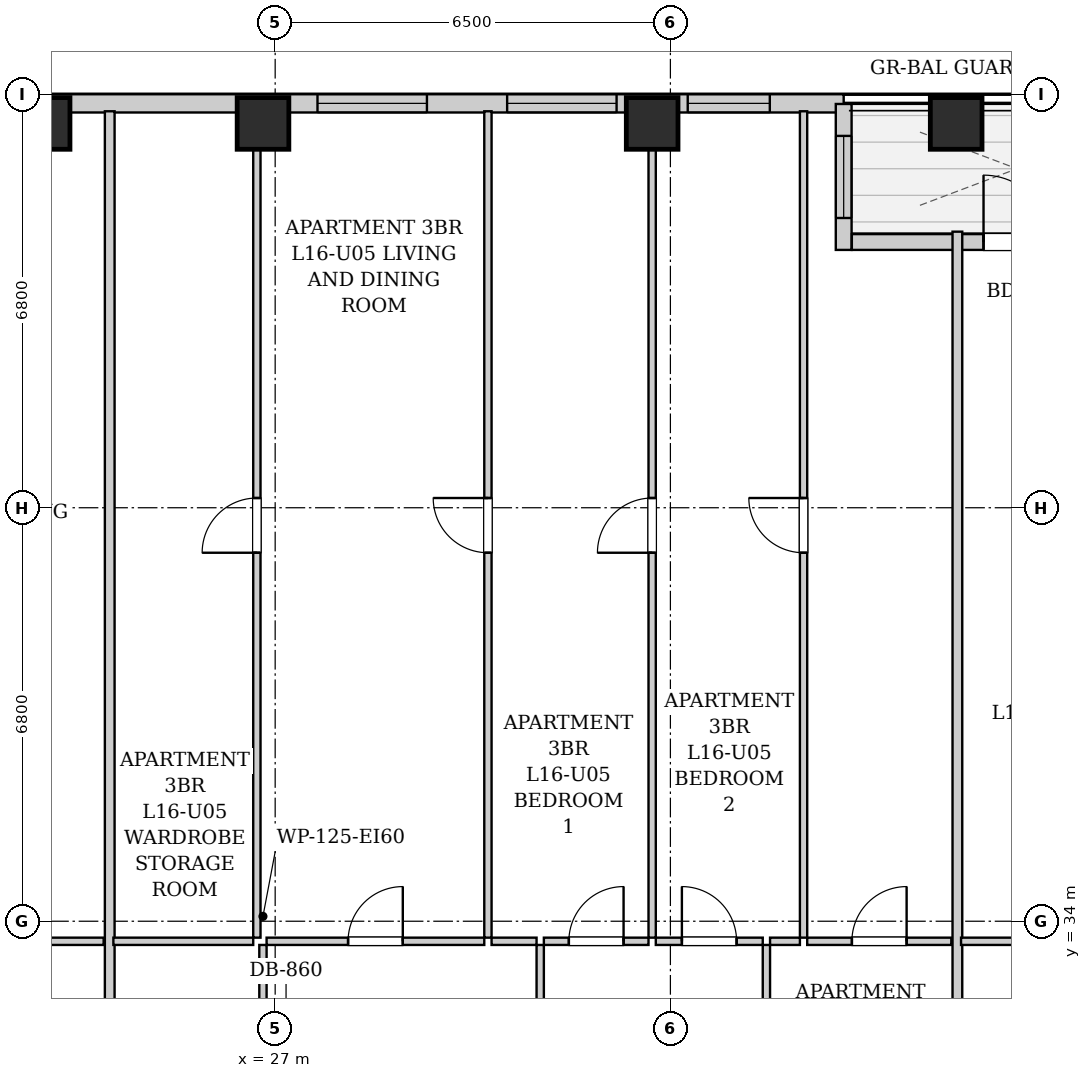
"""IFC4 building model, lengths in metres.
Left out: names, types, materials, properties, quantities, classifications, styles, units other than length and angle.
Written with IfcOpenShell. Run it as: python <this file> out.ifc"""

import sys

from ifc_helpers import new_model, si_unit, direction, frame, frame_2d, origin, origin_2d, place, context, subcontext, project, spatial, rectangle, extrude, element, fill, save


model = new_model("IFC4")
c1 = context("Model", 3, precision=1e-05, world=origin(), true_north=direction((0.0, 1.0)))
c2 = subcontext(c1, "Body", "Model", "MODEL_VIEW")
j1 = project(units=[si_unit("LENGTHUNIT", "METRE"), si_unit("PLANEANGLEUNIT", "RADIAN")], contexts=[c1])
p1 = place(None, origin())
s1 = spatial("IfcSite", under=j1, at=p1, CompositionType="ELEMENT")
p2 = place(p1, origin())
s2 = spatial("IfcBuilding", under=s1, at=p2, CompositionType="ELEMENT")
p3 = place(p2, frame((0.0, 0.0, 61.0)))
s3 = spatial("IfcBuildingStorey", under=s2, at=p3, CompositionType="ELEMENT", Elevation=61.0)
for number, where, z_axis, x_axis in (
    (1, (23.2, 47.12, 0.0), (0.0, 0.0, 1.0), (1.0, 0.0, 0.0)),
    (2, (26.8, 47.12, 0.0), (0.0, 0.0, 1.0), (1.0, 0.0, 0.0)),
    (3, (33.2, 47.12, 0.0), (0.0, 0.0, 1.0), (1.0, 0.0, 0.0)),
    (4, (38.2, 47.12, 0.0), (0.0, 0.0, 1.0), (1.0, 0.0, 0.0)),
):
    element("IfcColumn", number, at=place(p3, frame(where, z_axis=z_axis, x_axis=x_axis)), inside=s3, PredefinedType="COLUMN", context=c2, shape_type="SweptSolid", body=[
        extrude(rectangle(XDim=0.85, YDim=0.85, at=origin_2d()), origin(), (0.0, 0.0, 1.0), 3.2),
    ])
p4 = place(p3, frame((10.0, 47.45, 0.0), z_axis=(0.0, 0.0, 1.0), x_axis=(1.0, 0.0, 0.0)))
e5 = element("IfcWall", 5, at=p4, inside=s3, PredefinedType="SOLIDWALL", context=c2, shape_type="SweptSolid", body=[
    extrude(rectangle(XDim=26.35, YDim=0.3, at=frame_2d((13.175, 0.0))), origin(), (0.0, 0.0, 1.0), 1.975),
])
p5 = place(p4, frame((1.735, 0.0, 0.55)))
e6 = element("IfcOpeningElement", 6, at=p5, cuts=e5, PredefinedType="OPENING", context=c2, shape_type="SweptSolid", body=[
    extrude(rectangle(XDim=1.8, YDim=1.2, at=frame_2d((0.9, 0.6))), frame((0.0, 0.16, 0.0), z_axis=(0.0, -1.0, 0.0), x_axis=(1.0, 0.0, 0.0)), (0.0, 0.0, 1.0), 0.32),
])
p6 = place(p4, frame((5.415, 0.0, 0.55)))
e7 = element("IfcOpeningElement", 7, at=p6, cuts=e5, PredefinedType="OPENING", context=c2, shape_type="SweptSolid", body=[
    extrude(rectangle(XDim=1.8, YDim=1.2, at=frame_2d((0.9, 0.6))), frame((0.0, 0.16, 0.0), z_axis=(0.0, -1.0, 0.0), x_axis=(1.0, 0.0, 0.0)), (0.0, 0.0, 1.0), 0.32),
])
p7 = place(p4, frame((10.618, 0.0, 0.55)))
e8 = element("IfcOpeningElement", 8, at=p7, cuts=e5, PredefinedType="OPENING", context=c2, shape_type="SweptSolid", body=[
    extrude(rectangle(XDim=1.8, YDim=1.2, at=frame_2d((0.9, 0.6))), frame((0.0, 0.16, 0.0), z_axis=(0.0, -1.0, 0.0), x_axis=(1.0, 0.0, 0.0)), (0.0, 0.0, 1.0), 0.32),
])
p8 = place(p4, frame((17.696, 0.0, 0.55)))
e9 = element("IfcOpeningElement", 9, at=p8, cuts=e5, PredefinedType="OPENING", context=c2, shape_type="SweptSolid", body=[
    extrude(rectangle(XDim=1.8, YDim=1.2, at=frame_2d((0.9, 0.6))), frame((0.0, 0.16, 0.0), z_axis=(0.0, -1.0, 0.0), x_axis=(1.0, 0.0, 0.0)), (0.0, 0.0, 1.0), 0.32),
])
p9 = place(p4, frame((20.815, 0.0, 0.55)))
e10 = element("IfcOpeningElement", 10, at=p9, cuts=e5, PredefinedType="OPENING", context=c2, shape_type="SweptSolid", body=[
    extrude(rectangle(XDim=1.8, YDim=1.2, at=frame_2d((0.9, 0.6))), frame((0.0, 0.16, 0.0), z_axis=(0.0, -1.0, 0.0), x_axis=(1.0, 0.0, 0.0)), (0.0, 0.0, 1.0), 0.32),
])
p10 = place(p4, frame((23.785, 0.0, 0.55)))
e11 = element("IfcOpeningElement", 11, at=p10, cuts=e5, PredefinedType="OPENING", context=c2, shape_type="SweptSolid", body=[
    extrude(rectangle(XDim=1.35, YDim=1.2, at=frame_2d((0.675, 0.6))), frame((0.0, 0.16, 0.0), z_axis=(0.0, -1.0, 0.0), x_axis=(1.0, 0.0, 0.0)), (0.0, 0.0, 1.0), 0.32),
])
p11 = place(p3, frame((36.35, 47.44, 0.0), z_axis=(0.0, 0.0, 1.0), x_axis=(0.0, -1.0, 0.0)))
e12 = element("IfcWall", 12, at=p11, inside=s3, PredefinedType="SOLIDWALL", context=c2, shape_type="SweptSolid", body=[
    extrude(rectangle(XDim=2.4, YDim=0.26, at=frame_2d((1.2, 0.0))), origin(), (0.0, 0.0, 1.0), 2.94),
])
p12 = place(p11, frame((0.525, 0.0, 0.55)))
e13 = element("IfcOpeningElement", 13, at=p12, cuts=e12, PredefinedType="OPENING", context=c2, shape_type="SweptSolid", body=[
    extrude(rectangle(XDim=1.35, YDim=1.2, at=frame_2d((0.675, 0.6))), frame((0.0, 0.14, 0.0), z_axis=(0.0, -1.0, 0.0), x_axis=(1.0, 0.0, 0.0)), (0.0, 0.0, 1.0), 0.28),
])
p13 = place(p3, frame((36.484, 45.17, 0.0), z_axis=(0.0, 0.0, 1.0), x_axis=(1.0, 0.0, 0.0)))
e14 = element("IfcWall", 14, at=p13, inside=s3, PredefinedType="SOLIDWALL", context=c2, shape_type="SweptSolid", body=[
    extrude(rectangle(XDim=5.432, YDim=0.26, at=frame_2d((2.716, 0.0))), origin(), (0.0, 0.0, 1.0), 2.94),
])
p14 = place(p13, frame((2.166, 0.0, 0.0)))
e15 = element("IfcOpeningElement", 15, at=p14, cuts=e14, PredefinedType="OPENING", context=c2, shape_type="SweptSolid", body=[
    extrude(rectangle(XDim=1.1, YDim=2.0, at=frame_2d((0.55, 1.0))), frame((0.0, 0.14, 0.0), z_axis=(0.0, -1.0, 0.0), x_axis=(1.0, 0.0, 0.0)), (0.0, 0.0, 1.0), 0.28),
])
p15 = place(p13, frame((3.526, 0.0, 0.85)))
e16 = element("IfcOpeningElement", 16, at=p15, cuts=e14, PredefinedType="OPENING", context=c2, shape_type="SweptSolid", body=[
    extrude(rectangle(XDim=1.35, YDim=1.65, at=frame_2d((0.675, 0.825))), frame((0.0, 0.14, 0.0), z_axis=(0.0, -1.0, 0.0), x_axis=(1.0, 0.0, 0.0)), (0.0, 0.0, 1.0), 0.28),
])
p16 = place(p3, frame((20.826, 33.67, 0.0), z_axis=(0.0, 0.0, 1.0), x_axis=(1.0, 0.0, 0.0)))
e17 = element("IfcWall", 17, at=p16, inside=s3, PredefinedType="PARTITIONING", context=c2, shape_type="SweptSolid", body=[
    extrude(rectangle(XDim=3.353, YDim=0.12, at=frame_2d((1.677, 0.0))), origin(), (0.0, 0.0, 1.0), 2.94),
])
p17 = place(p16, frame((1.226, 0.0, 0.0)))
e18 = element("IfcOpeningElement", 18, at=p17, cuts=e17, PredefinedType="OPENING", context=c2, shape_type="SweptSolid", body=[
    extrude(rectangle(XDim=0.9, YDim=2.05, at=frame_2d((0.45, 1.025))), frame((0.0, 0.07, 0.0), z_axis=(0.0, -1.0, 0.0), x_axis=(1.0, 0.0, 0.0)), (0.0, 0.0, 1.0), 0.14),
])
p18 = place(p3, frame((24.279, 30.76, 0.0), z_axis=(0.0, 0.0, 1.0), x_axis=(0.0, 1.0, 0.0)))
e19 = element("IfcWall", 19, at=p18, inside=s3, PredefinedType="PARTITIONING", context=c2, shape_type="SweptSolid", body=[
    extrude(rectangle(XDim=16.56, YDim=0.16, at=frame_2d((8.28, 0.0))), origin(), (0.0, 0.0, 1.0), 2.94),
])
p19 = place(p3, frame((26.799, 30.76, 0.0), z_axis=(0.0, 0.0, 1.0), x_axis=(0.0, 1.0, 0.0)))
e20 = element("IfcWall", 20, at=p19, inside=s3, PredefinedType="PARTITIONING", context=c2, shape_type="SweptSolid", body=[
    extrude(rectangle(XDim=2.85, YDim=0.12, at=frame_2d((1.425, 0.0))), origin(), (0.0, 0.0, 1.0), 2.94),
])
p20 = place(p19, frame((0.995, 0.0, 0.0)))
e21 = element("IfcOpeningElement", 21, at=p20, cuts=e20, PredefinedType="OPENING", context=c2, shape_type="SweptSolid", body=[
    extrude(rectangle(XDim=0.86, YDim=2.05, at=frame_2d((0.43, 1.025))), frame((0.0, 0.07, 0.0), z_axis=(0.0, -1.0, 0.0), x_axis=(1.0, 0.0, 0.0)), (0.0, 0.0, 1.0), 0.14),
])
p21 = place(p3, frame((24.339, 33.67, 0.0), z_axis=(0.0, 0.0, 1.0), x_axis=(1.0, 0.0, 0.0)))
e22 = element("IfcWall", 22, at=p21, inside=s3, PredefinedType="PARTITIONING", context=c2, shape_type="SweptSolid", body=[
    extrude(rectangle(XDim=2.3, YDim=0.12, at=frame_2d((1.15, 0.0))), origin(), (0.0, 0.0, 1.0), 2.94),
])
p22 = place(p3, frame((31.359, 30.76, 0.0), z_axis=(0.0, 0.0, 1.0), x_axis=(0.0, 1.0, 0.0)))
e23 = element("IfcWall", 23, at=p22, inside=s3, PredefinedType="PARTITIONING", context=c2, shape_type="SweptSolid", body=[
    extrude(rectangle(XDim=2.85, YDim=0.12, at=frame_2d((1.425, 0.0))), origin(), (0.0, 0.0, 1.0), 2.94),
])
p23 = place(p22, frame((0.975, 0.0, 0.0)))
e24 = element("IfcOpeningElement", 24, at=p23, cuts=e23, PredefinedType="OPENING", context=c2, shape_type="SweptSolid", body=[
    extrude(rectangle(XDim=0.9, YDim=2.05, at=frame_2d((0.45, 1.025))), frame((0.0, 0.07, 0.0), z_axis=(0.0, -1.0, 0.0), x_axis=(1.0, 0.0, 0.0)), (0.0, 0.0, 1.0), 0.14),
])
p24 = place(p3, frame((26.859, 33.67, 0.0), z_axis=(0.0, 0.0, 1.0), x_axis=(1.0, 0.0, 0.0)))
e25 = element("IfcWall", 25, at=p24, inside=s3, PredefinedType="PARTITIONING", context=c2, shape_type="SweptSolid", body=[
    extrude(rectangle(XDim=3.58, YDim=0.12, at=frame_2d((1.79, 0.0))), origin(), (0.0, 0.0, 1.0), 2.94),
])
p25 = place(p24, frame((1.34, 0.0, 0.0)))
e26 = element("IfcOpeningElement", 26, at=p25, cuts=e25, PredefinedType="OPENING", context=c2, shape_type="SweptSolid", body=[
    extrude(rectangle(XDim=0.9, YDim=2.05, at=frame_2d((0.45, 1.025))), frame((0.0, 0.07, 0.0), z_axis=(0.0, -1.0, 0.0), x_axis=(1.0, 0.0, 0.0)), (0.0, 0.0, 1.0), 0.14),
])
p26 = place(p3, frame((30.559, 33.67, 0.0), z_axis=(0.0, 0.0, 1.0), x_axis=(1.0, 0.0, 0.0)))
e27 = element("IfcWall", 27, at=p26, inside=s3, PredefinedType="PARTITIONING", context=c2, shape_type="SweptSolid", body=[
    extrude(rectangle(XDim=0.74, YDim=0.12, at=frame_2d((0.37, 0.0))), origin(), (0.0, 0.0, 1.0), 2.94),
])
p27 = place(p3, frame((35.079, 30.76, 0.0), z_axis=(0.0, 0.0, 1.0), x_axis=(0.0, 1.0, 0.0)))
e28 = element("IfcWall", 28, at=p27, inside=s3, PredefinedType="PARTITIONING", context=c2, shape_type="SweptSolid", body=[
    extrude(rectangle(XDim=2.85, YDim=0.12, at=frame_2d((1.425, 0.0))), origin(), (0.0, 0.0, 1.0), 2.94),
])
p28 = place(p27, frame((0.975, 0.0, 0.0)))
e29 = element("IfcOpeningElement", 29, at=p28, cuts=e28, PredefinedType="OPENING", context=c2, shape_type="SweptSolid", body=[
    extrude(rectangle(XDim=0.9, YDim=2.05, at=frame_2d((0.45, 1.025))), frame((0.0, 0.07, 0.0), z_axis=(0.0, -1.0, 0.0), x_axis=(1.0, 0.0, 0.0)), (0.0, 0.0, 1.0), 0.14),
])
p29 = place(p3, frame((31.419, 33.67, 0.0), z_axis=(0.0, 0.0, 1.0), x_axis=(1.0, 0.0, 0.0)))
e30 = element("IfcWall", 30, at=p29, inside=s3, PredefinedType="PARTITIONING", context=c2, shape_type="SweptSolid", body=[
    extrude(rectangle(XDim=1.721, YDim=0.12, at=frame_2d((0.86, 0.0))), origin(), (0.0, 0.0, 1.0), 2.94),
])
p30 = place(p29, frame((0.411, 0.0, 0.0)))
e31 = element("IfcOpeningElement", 31, at=p30, cuts=e30, PredefinedType="OPENING", context=c2, shape_type="SweptSolid", body=[
    extrude(rectangle(XDim=0.9, YDim=2.05, at=frame_2d((0.45, 1.025))), frame((0.0, 0.07, 0.0), z_axis=(0.0, -1.0, 0.0), x_axis=(1.0, 0.0, 0.0)), (0.0, 0.0, 1.0), 0.14),
])
p31 = place(p3, frame((33.26, 33.67, 0.0), z_axis=(0.0, 0.0, 1.0), x_axis=(1.0, 0.0, 0.0)))
e32 = element("IfcWall", 32, at=p31, inside=s3, PredefinedType="PARTITIONING", context=c2, shape_type="SweptSolid", body=[
    extrude(rectangle(XDim=1.759, YDim=0.12, at=frame_2d((0.879, 0.0))), origin(), (0.0, 0.0, 1.0), 2.94),
])
p32 = place(p31, frame((0.429, 0.0, 0.0)))
e33 = element("IfcOpeningElement", 33, at=p32, cuts=e32, PredefinedType="OPENING", context=c2, shape_type="SweptSolid", body=[
    extrude(rectangle(XDim=0.9, YDim=2.05, at=frame_2d((0.45, 1.025))), frame((0.0, 0.07, 0.0), z_axis=(0.0, -1.0, 0.0), x_axis=(1.0, 0.0, 0.0)), (0.0, 0.0, 1.0), 0.14),
])
p33 = place(p3, frame((35.139, 33.67, 0.0), z_axis=(0.0, 0.0, 1.0), x_axis=(1.0, 0.0, 0.0)))
e34 = element("IfcWall", 34, at=p33, inside=s3, PredefinedType="PARTITIONING", context=c2, shape_type="SweptSolid", body=[
    extrude(rectangle(XDim=0.491, YDim=0.12, at=frame_2d((0.246, 0.0))), origin(), (0.0, 0.0, 1.0), 2.94),
])
p34 = place(p3, frame((35.75, 33.67, 0.0), z_axis=(0.0, 0.0, 1.0), x_axis=(1.0, 0.0, 0.0)))
e35 = element("IfcWall", 35, at=p34, inside=s3, PredefinedType="PARTITIONING", context=c2, shape_type="SweptSolid", body=[
    extrude(rectangle(XDim=2.37, YDim=0.12, at=frame_2d((1.185, 0.0))), origin(), (0.0, 0.0, 1.0), 2.94),
])
p35 = place(p34, frame((0.735, 0.0, 0.0)))
e36 = element("IfcOpeningElement", 36, at=p35, cuts=e35, PredefinedType="OPENING", context=c2, shape_type="SweptSolid", body=[
    extrude(rectangle(XDim=0.9, YDim=2.05, at=frame_2d((0.45, 1.025))), frame((0.0, 0.07, 0.0), z_axis=(0.0, -1.0, 0.0), x_axis=(1.0, 0.0, 0.0)), (0.0, 0.0, 1.0), 0.14),
])
p36 = place(p3, frame((26.699, 33.73, 0.0), z_axis=(0.0, 0.0, 1.0), x_axis=(0.0, 1.0, 0.0)))
e37 = element("IfcWall", 37, at=p36, inside=s3, PredefinedType="PARTITIONING", context=c2, shape_type="SweptSolid", body=[
    extrude(rectangle(XDim=13.59, YDim=0.12, at=frame_2d((6.795, 0.0))), origin(), (0.0, 0.0, 1.0), 2.94),
])
p37 = place(p36, frame((6.33, 0.0, 0.0)))
e38 = element("IfcOpeningElement", 38, at=p37, cuts=e37, PredefinedType="OPENING", context=c2, shape_type="SweptSolid", body=[
    extrude(rectangle(XDim=0.9, YDim=2.05, at=frame_2d((0.45, 1.025))), frame((0.0, 0.07, 0.0), z_axis=(0.0, -1.0, 0.0), x_axis=(1.0, 0.0, 0.0)), (0.0, 0.0, 1.0), 0.14),
])
p38 = place(p3, frame((30.499, 33.73, 0.0), z_axis=(0.0, 0.0, 1.0), x_axis=(0.0, 1.0, 0.0)))
e39 = element("IfcWall", 39, at=p38, inside=s3, PredefinedType="PARTITIONING", context=c2, shape_type="SweptSolid", body=[
    extrude(rectangle(XDim=13.59, YDim=0.12, at=frame_2d((6.795, 0.0))), origin(), (0.0, 0.0, 1.0), 2.94),
])
p39 = place(p38, frame((6.33, 0.0, 0.0)))
e40 = element("IfcOpeningElement", 40, at=p39, cuts=e39, PredefinedType="OPENING", context=c2, shape_type="SweptSolid", body=[
    extrude(rectangle(XDim=0.9, YDim=2.05, at=frame_2d((0.45, 1.025))), frame((0.0, 0.07, 0.0), z_axis=(0.0, -1.0, 0.0), x_axis=(1.0, 0.0, 0.0)), (0.0, 0.0, 1.0), 0.14),
])
p40 = place(p3, frame((33.2, 33.73, 0.0), z_axis=(0.0, 0.0, 1.0), x_axis=(0.0, 1.0, 0.0)))
e41 = element("IfcWall", 41, at=p40, inside=s3, PredefinedType="PARTITIONING", context=c2, shape_type="SweptSolid", body=[
    extrude(rectangle(XDim=13.59, YDim=0.12, at=frame_2d((6.795, 0.0))), origin(), (0.0, 0.0, 1.0), 2.232),
])
p41 = place(p40, frame((6.33, 0.0, 0.0)))
e42 = element("IfcOpeningElement", 42, at=p41, cuts=e41, PredefinedType="OPENING", context=c2, shape_type="SweptSolid", body=[
    extrude(rectangle(XDim=0.9, YDim=2.05, at=frame_2d((0.45, 1.025))), frame((0.0, 0.07, 0.0), z_axis=(0.0, -1.0, 0.0), x_axis=(1.0, 0.0, 0.0)), (0.0, 0.0, 1.0), 0.14),
])
p42 = place(p3, frame((35.69, 33.73, 0.0), z_axis=(0.0, 0.0, 1.0), x_axis=(0.0, 1.0, 0.0)))
e43 = element("IfcWall", 43, at=p42, inside=s3, PredefinedType="PARTITIONING", context=c2, shape_type="SweptSolid", body=[
    extrude(rectangle(XDim=13.59, YDim=0.12, at=frame_2d((6.795, 0.0))), origin(), (0.0, 0.0, 1.0), 2.94),
])
p43 = place(p42, frame((6.33, 0.0, 0.0)))
e44 = element("IfcOpeningElement", 44, at=p43, cuts=e43, PredefinedType="OPENING", context=c2, shape_type="SweptSolid", body=[
    extrude(rectangle(XDim=0.9, YDim=2.05, at=frame_2d((0.45, 1.025))), frame((0.0, 0.07, 0.0), z_axis=(0.0, -1.0, 0.0), x_axis=(1.0, 0.0, 0.0)), (0.0, 0.0, 1.0), 0.14),
])
p44 = place(p3, frame((38.22, 30.76, 0.0), z_axis=(0.0, 0.0, 1.0), x_axis=(0.0, 1.0, 0.0)))
e45 = element("IfcWall", 45, at=p44, inside=s3, PredefinedType="PARTITIONING", context=c2, shape_type="SweptSolid", body=[
    extrude(rectangle(XDim=14.58, YDim=0.16, at=frame_2d((7.29, 0.0))), origin(), (0.0, 0.0, 1.0), 2.94),
])
p45 = place(p3, frame((38.28, 33.67, 0.0), z_axis=(0.0, 0.0, 1.0), x_axis=(1.0, 0.0, 0.0)))
e46 = element("IfcWall", 46, at=p45, inside=s3, PredefinedType="PARTITIONING", context=c2, shape_type="SweptSolid", body=[
    extrude(rectangle(XDim=1.85, YDim=0.12, at=frame_2d((0.925, 0.0))), origin(), (0.0, 0.0, 1.0), 2.94),
])
p46 = place(p25, origin())
e47 = element("IfcDoor", 47, at=p46, inside=s3, OperationType="SINGLE_SWING_RIGHT", PredefinedType="DOOR", context=c2, shape_type="SweptSolid", body=[
    extrude(rectangle(XDim=0.9, YDim=2.05, at=frame_2d((0.45, 1.025))), frame((0.0, 0.025, 0.0), z_axis=(0.0, -1.0, 0.0), x_axis=(1.0, 0.0, 0.0)), (0.0, 0.0, 1.0), 0.05),
])
fill(e26, e47)
p47 = place(p30, origin())
e48 = element("IfcDoor", 48, at=p47, inside=s3, OperationType="SINGLE_SWING_RIGHT", PredefinedType="DOOR", context=c2, shape_type="SweptSolid", body=[
    extrude(rectangle(XDim=0.9, YDim=2.05, at=frame_2d((0.45, 1.025))), frame((0.0, 0.025, 0.0), z_axis=(0.0, -1.0, 0.0), x_axis=(1.0, 0.0, 0.0)), (0.0, 0.0, 1.0), 0.05),
])
fill(e31, e48)
p48 = place(p32, origin())
e49 = element("IfcDoor", 49, at=p48, inside=s3, OperationType="SINGLE_SWING_LEFT", PredefinedType="DOOR", context=c2, shape_type="SweptSolid", body=[
    extrude(rectangle(XDim=0.9, YDim=2.05, at=frame_2d((0.45, 1.025))), frame((0.0, 0.025, 0.0), z_axis=(0.0, -1.0, 0.0), x_axis=(1.0, 0.0, 0.0)), (0.0, 0.0, 1.0), 0.05),
])
fill(e33, e49)
p49 = place(p35, origin())
e50 = element("IfcDoor", 50, at=p49, inside=s3, OperationType="SINGLE_SWING_RIGHT", PredefinedType="DOOR", context=c2, shape_type="SweptSolid", body=[
    extrude(rectangle(XDim=0.9, YDim=2.05, at=frame_2d((0.45, 1.025))), frame((0.0, 0.025, 0.0), z_axis=(0.0, -1.0, 0.0), x_axis=(1.0, 0.0, 0.0)), (0.0, 0.0, 1.0), 0.05),
])
fill(e36, e50)
p50 = place(p37, origin())
e51 = element("IfcDoor", 51, at=p50, inside=s3, OperationType="SINGLE_SWING_LEFT", PredefinedType="DOOR", context=c2, shape_type="SweptSolid", body=[
    extrude(rectangle(XDim=0.9, YDim=2.05, at=frame_2d((0.45, 1.025))), frame((0.0, 0.025, 0.0), z_axis=(0.0, -1.0, 0.0), x_axis=(1.0, 0.0, 0.0)), (0.0, 0.0, 1.0), 0.05),
])
fill(e38, e51)
p51 = place(p39, origin())
e52 = element("IfcDoor", 52, at=p51, inside=s3, OperationType="SINGLE_SWING_RIGHT", PredefinedType="DOOR", context=c2, shape_type="SweptSolid", body=[
    extrude(rectangle(XDim=0.9, YDim=2.05, at=frame_2d((0.45, 1.025))), frame((0.0, 0.025, 0.0), z_axis=(0.0, -1.0, 0.0), x_axis=(1.0, 0.0, 0.0)), (0.0, 0.0, 1.0), 0.05),
])
fill(e40, e52)
p52 = place(p41, origin())
e53 = element("IfcDoor", 53, at=p52, inside=s3, OperationType="SINGLE_SWING_LEFT", PredefinedType="DOOR", context=c2, shape_type="SweptSolid", body=[
    extrude(rectangle(XDim=0.9, YDim=2.05, at=frame_2d((0.45, 1.025))), frame((0.0, 0.025, 0.0), z_axis=(0.0, -1.0, 0.0), x_axis=(1.0, 0.0, 0.0)), (0.0, 0.0, 1.0), 0.05),
])
fill(e42, e53)
p53 = place(p43, origin())
e54 = element("IfcDoor", 54, at=p53, inside=s3, OperationType="SINGLE_SWING_RIGHT", PredefinedType="DOOR", context=c2, shape_type="SweptSolid", body=[
    extrude(rectangle(XDim=0.9, YDim=2.05, at=frame_2d((0.45, 1.025))), frame((0.0, 0.025, 0.0), z_axis=(0.0, -1.0, 0.0), x_axis=(1.0, 0.0, 0.0)), (0.0, 0.0, 1.0), 0.05),
])
fill(e44, e54)
p54 = place(p14, origin())
e55 = element("IfcDoor", 55, at=p54, inside=s3, OperationType="SINGLE_SWING_LEFT", PredefinedType="DOOR", context=c2, shape_type="SweptSolid", body=[
    extrude(rectangle(XDim=1.1, YDim=2.0, at=frame_2d((0.55, 1.0))), frame((0.0, 0.025, 0.0), z_axis=(0.0, -1.0, 0.0), x_axis=(1.0, 0.0, 0.0)), (0.0, 0.0, 1.0), 0.05),
])
fill(e15, e55)
p55 = place(p8, origin())
e56 = element("IfcWindow", 56, at=p55, inside=s3, PartitioningType="DOUBLE_PANEL_VERTICAL", PredefinedType="WINDOW", context=c2, shape_type="SweptSolid", body=[
    extrude(rectangle(XDim=1.8, YDim=1.2, at=frame_2d((0.9, 0.6))), frame((0.0, 0.03, 0.0), z_axis=(0.0, -1.0, 0.0), x_axis=(1.0, 0.0, 0.0)), (0.0, 0.0, 1.0), 0.06),
])
fill(e9, e56)
p56 = place(p9, origin())
e57 = element("IfcWindow", 57, at=p56, inside=s3, PartitioningType="DOUBLE_PANEL_VERTICAL", PredefinedType="WINDOW", context=c2, shape_type="SweptSolid", body=[
    extrude(rectangle(XDim=1.8, YDim=1.2, at=frame_2d((0.9, 0.6))), frame((0.0, 0.03, 0.0), z_axis=(0.0, -1.0, 0.0), x_axis=(1.0, 0.0, 0.0)), (0.0, 0.0, 1.0), 0.06),
])
fill(e10, e57)
p57 = place(p10, origin())
e58 = element("IfcWindow", 58, at=p57, inside=s3, PartitioningType="SINGLE_PANEL", PredefinedType="WINDOW", context=c2, shape_type="SweptSolid", body=[
    extrude(rectangle(XDim=1.35, YDim=1.2, at=frame_2d((0.675, 0.6))), frame((0.0, 0.03, 0.0), z_axis=(0.0, -1.0, 0.0), x_axis=(1.0, 0.0, 0.0)), (0.0, 0.0, 1.0), 0.06),
])
fill(e11, e58)
p58 = place(p12, origin())
e59 = element("IfcWindow", 59, at=p58, inside=s3, PartitioningType="SINGLE_PANEL", PredefinedType="WINDOW", context=c2, shape_type="SweptSolid", body=[
    extrude(rectangle(XDim=1.35, YDim=1.2, at=frame_2d((0.675, 0.6))), frame((0.0, 0.03, 0.0), z_axis=(0.0, -1.0, 0.0), x_axis=(1.0, 0.0, 0.0)), (0.0, 0.0, 1.0), 0.06),
])
fill(e13, e59)
save(model, sys.argv[1])
